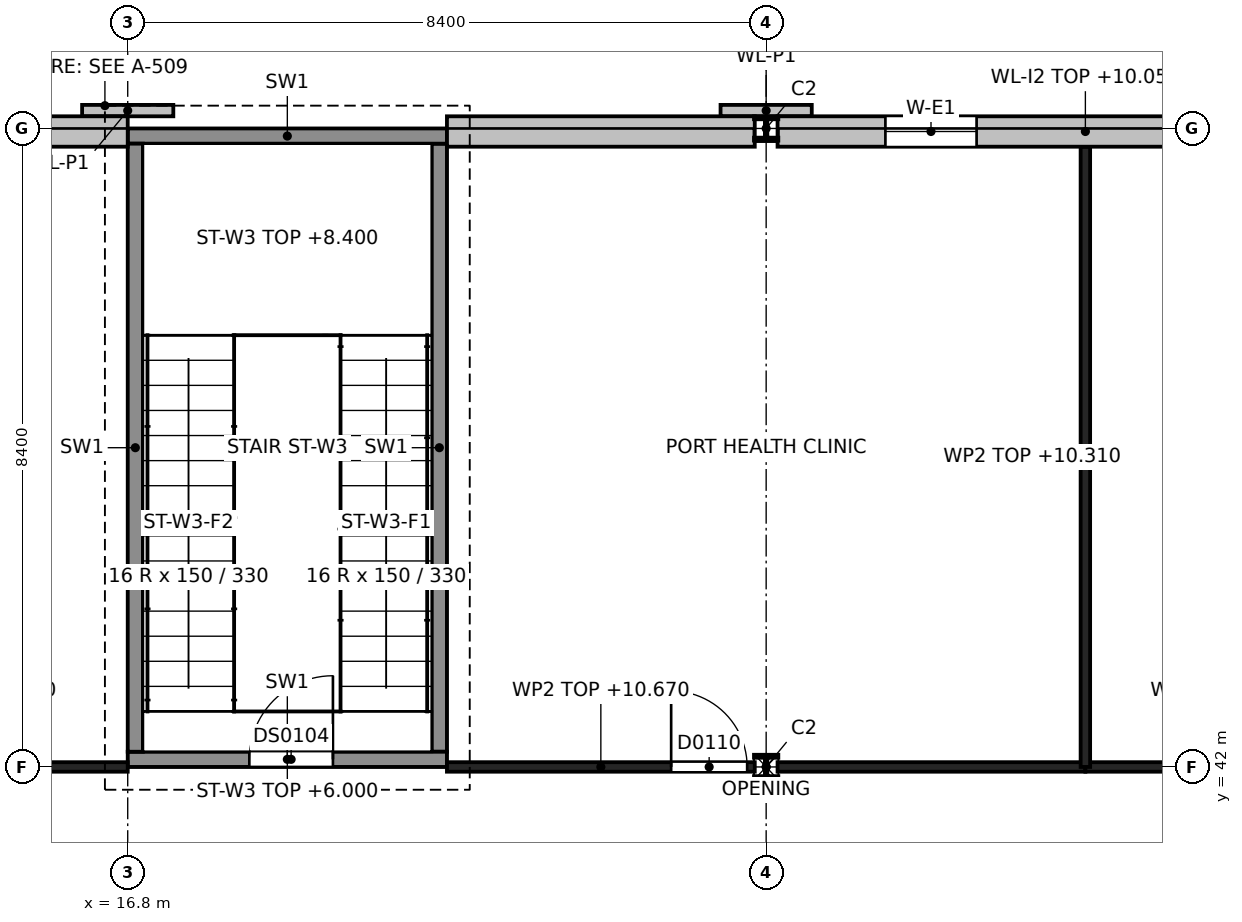
"""IFC4 building model, lengths in metres.
Left out: names, types, materials, properties, quantities, classifications, styles, units other than length and angle.
Written with IfcOpenShell. Run it as: python <this file> out.ifc"""

import sys

from ifc_helpers import new_model, si_unit, direction, frame, frame_2d, origin, origin_2d, place, context, subcontext, project, spatial, rectangle, i_section, extrude, element, fill, save


model = new_model("IFC4")
c1 = context("Model", 3, precision=1e-05, world=origin(), true_north=direction((0.0, 1.0)))
c2 = subcontext(c1, "Body", "Model", "MODEL_VIEW")
j1 = project(units=[si_unit("LENGTHUNIT", "METRE"), si_unit("PLANEANGLEUNIT", "RADIAN")], contexts=[c1])
p1 = place(None, origin())
s1 = spatial("IfcSite", under=j1, at=p1, CompositionType="ELEMENT")
p2 = place(p1, origin())
s2 = spatial("IfcBuilding", under=s1, at=p2, CompositionType="ELEMENT")
p3 = place(p2, frame((0.0, 0.0, 6.0)))
s3 = spatial("IfcBuildingStorey", under=s2, at=p3, CompositionType="ELEMENT", Elevation=6.0)
for number, where, z_axis, x_axis in (
    (1, (25.2, 42.0, 0.0), (0.0, 0.0, 1.0), (1.0, 0.0, 0.0)),
    (2, (25.2, 50.4, 0.0), (0.0, 0.0, 1.0), (1.0, 0.0, 0.0)),
):
    element("IfcColumn", number, at=place(p3, frame(where, z_axis=z_axis, x_axis=x_axis)), inside=s3, PredefinedType="COLUMN", context=c2, shape_type="SweptSolid", body=[
        extrude(i_section(OverallWidth=0.3, OverallDepth=0.3, WebThickness=0.011, FlangeThickness=0.019, at=origin_2d()), origin(), (0.0, 0.0, 1.0), 4.8),
    ])
p4 = place(p3, frame((16.8, 42.1, 0.0), z_axis=(0.0, 0.0, 1.0), x_axis=(1.0, 0.0, 0.0)))
e3 = element("IfcWall", 3, at=p4, inside=s3, PredefinedType="SHEAR", context=c2, shape_type="SweptSolid", body=[
    extrude(rectangle(XDim=4.2, YDim=0.2, at=frame_2d((2.1, 0.0))), origin(), (0.0, 0.0, 1.0), 4.8),
])
p5 = place(p4, frame((1.6, 0.0, 0.0)))
e4 = element("IfcOpeningElement", 4, at=p5, cuts=e3, PredefinedType="OPENING", context=c2, shape_type="SweptSolid", body=[
    extrude(rectangle(XDim=1.1, YDim=2.1, at=frame_2d((0.55, 1.05))), frame((0.0, 0.1, 0.0), z_axis=(0.0, -1.0, 0.0), x_axis=(1.0, 0.0, 0.0)), (0.0, 0.0, 1.0), 0.2),
])
p6 = place(p3, frame((16.8, 50.3, 0.0), z_axis=(0.0, 0.0, 1.0), x_axis=(1.0, 0.0, 0.0)))
e5 = element("IfcWall", 5, at=p6, inside=s3, PredefinedType="SHEAR", context=c2, shape_type="SweptSolid", body=[
    extrude(rectangle(XDim=4.2, YDim=0.2, at=frame_2d((2.1, 0.0))), origin(), (0.0, 0.0, 1.0), 4.8),
])
for number, where, z_axis, x_axis in (
    (6, (16.9, 42.2, 0.0), (0.0, 0.0, 1.0), (0.0, 1.0, 0.0)),
    (7, (20.9, 42.2, 0.0), (0.0, 0.0, 1.0), (0.0, 1.0, 0.0)),
):
    element("IfcWall", number, at=place(p3, frame(where, z_axis=z_axis, x_axis=x_axis)), inside=s3, PredefinedType="SHEAR", context=c2, shape_type="SweptSolid", body=[
        extrude(rectangle(XDim=8.0, YDim=0.2, at=frame_2d((4.0, 0.0))), origin(), (0.0, 0.0, 1.0), 4.8),
    ])
p7 = place(p3, frame((8.55, 50.36, 0.0), z_axis=(0.0, 0.0, 1.0), x_axis=(1.0, 0.0, 0.0)))
e8 = element("IfcWall", 8, at=p7, inside=s3, PredefinedType="SOLIDWALL", context=c2, shape_type="SweptSolid", body=[
    extrude(rectangle(XDim=8.25, YDim=0.4, at=frame_2d((4.125, 0.0))), origin(), (0.0, 0.0, 1.0), 4.05),
])
p8 = place(p7, frame((1.419, 0.0, 0.9)))
e9 = element("IfcOpeningElement", 9, at=p8, cuts=e8, PredefinedType="OPENING", context=c2, shape_type="SweptSolid", body=[
    extrude(rectangle(XDim=1.2, YDim=3.0, at=frame_2d((0.6, 1.5))), frame((0.0, 0.2, 0.0), z_axis=(0.0, -1.0, 0.0), x_axis=(1.0, 0.0, 0.0)), (0.0, 0.0, 1.0), 0.4),
])
p9 = place(p7, frame((5.481, 0.0, 0.9)))
e10 = element("IfcOpeningElement", 10, at=p9, cuts=e8, PredefinedType="OPENING", context=c2, shape_type="SweptSolid", body=[
    extrude(rectangle(XDim=1.2, YDim=3.0, at=frame_2d((0.6, 1.5))), frame((0.0, 0.2, 0.0), z_axis=(0.0, -1.0, 0.0), x_axis=(1.0, 0.0, 0.0)), (0.0, 0.0, 1.0), 0.4),
])
p10 = place(p3, frame((21.0, 50.36, 0.0), z_axis=(0.0, 0.0, 1.0), x_axis=(1.0, 0.0, 0.0)))
e11 = element("IfcWall", 11, at=p10, inside=s3, PredefinedType="SOLIDWALL", context=c2, shape_type="SweptSolid", body=[
    extrude(rectangle(XDim=4.05, YDim=0.4, at=frame_2d((2.025, 0.0))), origin(), (0.0, 0.0, 1.0), 4.05),
])
p11 = place(p3, frame((25.35, 50.36, 0.0), z_axis=(0.0, 0.0, 1.0), x_axis=(1.0, 0.0, 0.0)))
e12 = element("IfcWall", 12, at=p11, inside=s3, PredefinedType="SOLIDWALL", context=c2, shape_type="SweptSolid", body=[
    extrude(rectangle(XDim=8.1, YDim=0.4, at=frame_2d((4.05, 0.0))), origin(), (0.0, 0.0, 1.0), 4.05),
])
p12 = place(p11, frame((1.419, 0.0, 0.9)))
e13 = element("IfcOpeningElement", 13, at=p12, cuts=e12, PredefinedType="OPENING", context=c2, shape_type="SweptSolid", body=[
    extrude(rectangle(XDim=1.2, YDim=3.0, at=frame_2d((0.6, 1.5))), frame((0.0, 0.2, 0.0), z_axis=(0.0, -1.0, 0.0), x_axis=(1.0, 0.0, 0.0)), (0.0, 0.0, 1.0), 0.4),
])
p13 = place(p11, frame((5.481, 0.0, 0.9)))
e14 = element("IfcOpeningElement", 14, at=p13, cuts=e12, PredefinedType="OPENING", context=c2, shape_type="SweptSolid", body=[
    extrude(rectangle(XDim=1.2, YDim=3.0, at=frame_2d((0.6, 1.5))), frame((0.0, 0.2, 0.0), z_axis=(0.0, -1.0, 0.0), x_axis=(1.0, 0.0, 0.0)), (0.0, 0.0, 1.0), 0.4),
])
for number, where, z_axis, x_axis in (
    (15, (16.2, 50.635, 0.0), (0.0, 0.0, 1.0), (1.0, 0.0, 0.0)),
    (16, (24.6, 50.635, 0.0), (0.0, 0.0, 1.0), (1.0, 0.0, 0.0)),
):
    element("IfcWall", number, at=place(p3, frame(where, z_axis=z_axis, x_axis=x_axis)), inside=s3, PredefinedType="SOLIDWALL", context=c2, shape_type="SweptSolid", body=[
        extrude(rectangle(XDim=1.2, YDim=0.15, at=frame_2d((0.6, 0.0))), origin(), (0.0, 0.0, 1.0), 4.8),
    ])
p14 = place(p3, frame((12.6, 42.0, 0.0), z_axis=(0.0, 0.0, 1.0), x_axis=(1.0, 0.0, 0.0)))
e17 = element("IfcWall", 17, at=p14, inside=s3, PredefinedType="PARTITIONING", context=c2, shape_type="SweptSolid", body=[
    extrude(rectangle(XDim=4.2, YDim=0.125, at=frame_2d((2.1, 0.0))), origin(), (0.0, 0.0, 1.0), 4.28),
])
p15 = place(p14, frame((1.6, 0.0, 0.0)))
e18 = element("IfcOpeningElement", 18, at=p15, cuts=e17, PredefinedType="OPENING", context=c2, shape_type="SweptSolid", body=[
    extrude(rectangle(XDim=1.0, YDim=2.2, at=frame_2d((0.5, 1.1))), frame((0.0, 0.062, 0.0), z_axis=(0.0, -1.0, 0.0), x_axis=(1.0, 0.0, 0.0)), (0.0, 0.0, 1.0), 0.125),
])
p16 = place(p3, frame((21.0, 42.0, 0.0), z_axis=(0.0, 0.0, 1.0), x_axis=(1.0, 0.0, 0.0)))
e19 = element("IfcWall", 19, at=p16, inside=s3, PredefinedType="PARTITIONING", context=c2, shape_type="SweptSolid", body=[
    extrude(rectangle(XDim=4.05, YDim=0.125, at=frame_2d((2.025, 0.0))), origin(), (0.0, 0.0, 1.0), 4.67),
])
p17 = place(p16, frame((2.95, 0.0, 0.0)))
e20 = element("IfcOpeningElement", 20, at=p17, cuts=e19, PredefinedType="OPENING", context=c2, shape_type="SweptSolid", body=[
    extrude(rectangle(XDim=1.0, YDim=2.2, at=frame_2d((0.5, 1.1))), frame((0.0, 0.062, 0.0), z_axis=(0.0, -1.0, 0.0), x_axis=(1.0, 0.0, 0.0)), (0.0, 0.0, 1.0), 0.125),
])
p18 = place(p3, frame((25.35, 42.0, 0.0), z_axis=(0.0, 0.0, 1.0), x_axis=(1.0, 0.0, 0.0)))
e21 = element("IfcWall", 21, at=p18, inside=s3, PredefinedType="PARTITIONING", context=c2, shape_type="SweptSolid", body=[
    extrude(rectangle(XDim=4.05, YDim=0.125, at=frame_2d((2.025, 0.0))), origin(), (0.0, 0.0, 1.0), 4.31),
])
p19 = place(p3, frame((29.4, 42.0, 0.0), z_axis=(0.0, 0.0, 1.0), x_axis=(1.0, 0.0, 0.0)))
e22 = element("IfcWall", 22, at=p19, inside=s3, PredefinedType="PARTITIONING", context=c2, shape_type="SweptSolid", body=[
    extrude(rectangle(XDim=4.05, YDim=0.125, at=frame_2d((2.025, 0.0))), origin(), (0.0, 0.0, 1.0), 4.31),
])
p20 = place(p19, frame((1.6, 0.0, 0.0)))
e23 = element("IfcOpeningElement", 23, at=p20, cuts=e22, PredefinedType="OPENING", context=c2, shape_type="SweptSolid", body=[
    extrude(rectangle(XDim=1.0, YDim=2.2, at=frame_2d((0.5, 1.1))), frame((0.0, 0.062, 0.0), z_axis=(0.0, -1.0, 0.0), x_axis=(1.0, 0.0, 0.0)), (0.0, 0.0, 1.0), 0.125),
])
p21 = place(p3, frame((29.4, 42.0, 0.0), z_axis=(0.0, 0.0, 1.0), x_axis=(0.0, 1.0, 0.0)))
e24 = element("IfcWall", 24, at=p21, inside=s3, PredefinedType="PARTITIONING", context=c2, shape_type="SweptSolid", body=[
    extrude(rectangle(XDim=8.159, YDim=0.125, at=frame_2d((4.08, 0.0))), origin(), (0.0, 0.0, 1.0), 4.31),
])
p22 = place(p12, origin())
e25 = element("IfcWindow", 25, at=p22, inside=s3, PartitioningType="SINGLE_PANEL", PredefinedType="WINDOW", context=c2, shape_type="SweptSolid", body=[
    extrude(rectangle(XDim=1.2, YDim=3.0, at=frame_2d((0.6, 1.5))), frame((0.0, 0.03, 0.0), z_axis=(0.0, -1.0, 0.0), x_axis=(1.0, 0.0, 0.0)), (0.0, 0.0, 1.0), 0.06),
])
fill(e13, e25)
p23 = place(p17, origin())
e26 = element("IfcDoor", 26, at=p23, inside=s3, OperationType="SINGLE_SWING_LEFT", PredefinedType="DOOR", context=c2, shape_type="SweptSolid", body=[
    extrude(rectangle(XDim=1.0, YDim=2.2, at=frame_2d((0.5, 1.1))), frame((0.0, 0.025, 0.0), z_axis=(0.0, -1.0, 0.0), x_axis=(1.0, 0.0, 0.0)), (0.0, 0.0, 1.0), 0.05),
])
fill(e20, e26)
p24 = place(p5, origin())
e27 = element("IfcDoor", 27, at=p24, inside=s3, OperationType="SINGLE_SWING_RIGHT", PredefinedType="DOOR", context=c2, shape_type="SweptSolid", body=[
    extrude(rectangle(XDim=1.1, YDim=2.1, at=frame_2d((0.55, 1.05))), frame((0.0, 0.025, 0.0), z_axis=(0.0, -1.0, 0.0), x_axis=(1.0, 0.0, 0.0)), (0.0, 0.0, 1.0), 0.05),
])
fill(e4, e27)
save(model, sys.argv[1])
